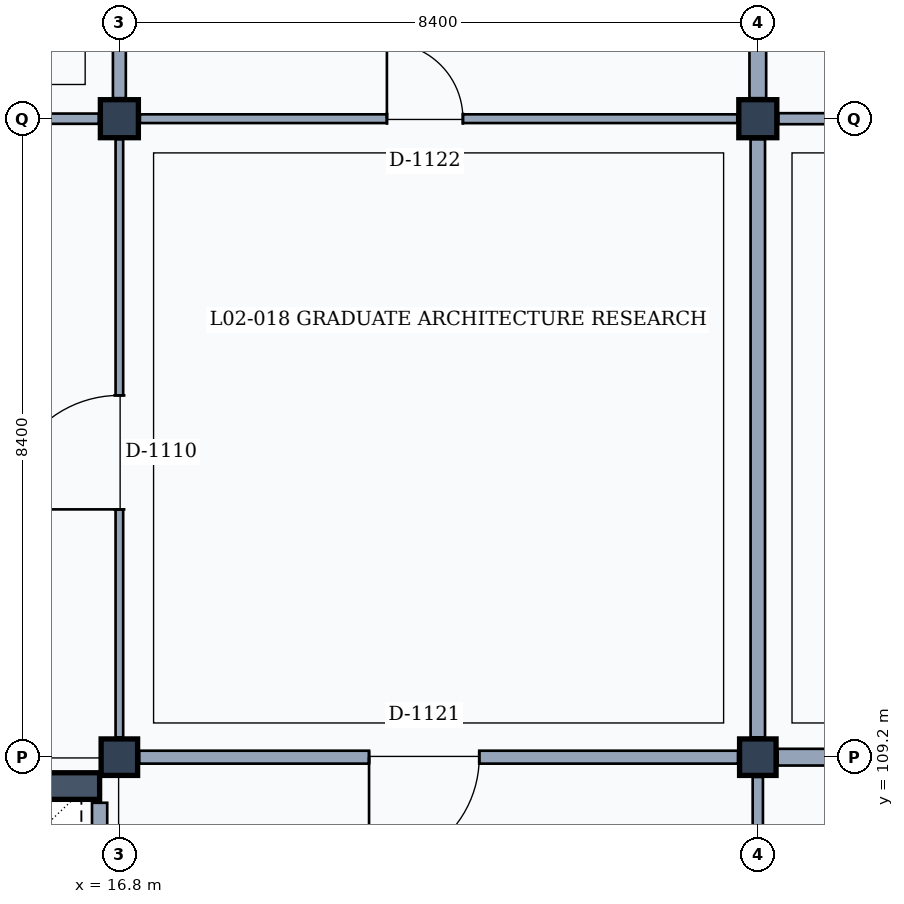
"""IFC4 building model, lengths in metres.
Left out: names, types, materials, properties, quantities, classifications, styles, units other than length and angle.
Written with IfcOpenShell. Run it as: python <this file> out.ifc"""

import sys

from ifc_helpers import new_model, si_unit, direction, frame, frame_2d, origin, origin_2d, place, context, subcontext, project, spatial, rectangle, extrude, element, fill, save


model = new_model("IFC4")
c1 = context("Model", 3, precision=1e-05, world=origin(), true_north=direction((0.0, 1.0)))
c2 = subcontext(c1, "Body", "Model", "MODEL_VIEW")
j1 = project(units=[si_unit("LENGTHUNIT", "METRE"), si_unit("PLANEANGLEUNIT", "RADIAN")], contexts=[c1])
p1 = place(None, origin())
s1 = spatial("IfcSite", under=j1, at=p1, CompositionType="ELEMENT")
p2 = place(p1, origin())
s2 = spatial("IfcBuilding", under=s1, at=p2, CompositionType="ELEMENT")
p3 = place(p2, frame((0.0, 0.0, 9.6)))
s3 = spatial("IfcBuildingStorey", under=s2, at=p3, CompositionType="ELEMENT", Elevation=9.6)
p4 = place(p3, frame((16.8, 109.2, 0.0), z_axis=(0.0, 0.0, 1.0), x_axis=(1.0, 0.0, 0.0)))
e1 = element("IfcColumn", 1, at=p4, inside=s3, PredefinedType="COLUMN", context=c2, shape_type="SweptSolid", body=[
    extrude(rectangle(XDim=0.48, YDim=0.48, at=origin_2d()), origin(), (0.0, 0.0, 1.0), 4.2),
])
p5 = place(p3, frame((16.8, 117.6, 0.0), z_axis=(0.0, 0.0, 1.0), x_axis=(1.0, 0.0, 0.0)))
e2 = element("IfcColumn", 2, at=p5, inside=s3, PredefinedType="COLUMN", context=c2, shape_type="SweptSolid", body=[
    extrude(rectangle(XDim=0.5, YDim=0.5, at=origin_2d()), origin(), (0.0, 0.0, 1.0), 4.2),
])
p6 = place(p3, frame((25.2, 109.2, 0.0), z_axis=(0.0, 0.0, 1.0), x_axis=(1.0, 0.0, 0.0)))
e3 = element("IfcColumn", 3, at=p6, inside=s3, PredefinedType="COLUMN", context=c2, shape_type="SweptSolid", body=[
    extrude(rectangle(XDim=0.48, YDim=0.48, at=origin_2d()), origin(), (0.0, 0.0, 1.0), 4.2),
])
p7 = place(p3, frame((25.2, 117.6, 0.0), z_axis=(0.0, 0.0, 1.0), x_axis=(1.0, 0.0, 0.0)))
e4 = element("IfcColumn", 4, at=p7, inside=s3, PredefinedType="COLUMN", context=c2, shape_type="SweptSolid", body=[
    extrude(rectangle(XDim=0.5, YDim=0.5, at=origin_2d()), origin(), (0.0, 0.0, 1.0), 4.2),
])
p8 = place(p3, frame((8.665, 108.82, 0.0), z_axis=(0.0, 0.0, 1.0), x_axis=(1.0, 0.0, 0.0)))
e5 = element("IfcWall", 5, at=p8, inside=s3, PredefinedType="SHEAR", context=c2, shape_type="SweptSolid", body=[
    extrude(rectangle(XDim=7.875, YDim=0.35, at=frame_2d((3.938, 0.0))), origin(), (0.0, 0.0, 1.0), 3.96),
])
p9 = place(p3, frame((16.54, 108.6, 0.0), z_axis=(0.0, 0.0, 1.0), x_axis=(0.0, -1.0, 0.0)))
e6 = element("IfcWall", 6, at=p9, inside=s3, PredefinedType="PARTITIONING", context=c2, shape_type="SweptSolid", body=[
    extrude(rectangle(XDim=7.2, YDim=0.2, at=frame_2d((3.6, 0.0))), origin(), (0.0, 0.0, 1.0), 3.32),
])
p10 = place(p9, frame((3.55, 0.0, 0.0)))
e7 = element("IfcOpeningElement", 7, at=p10, cuts=e6, PredefinedType="OPENING", context=c2, shape_type="SweptSolid", body=[
    extrude(rectangle(XDim=1.1, YDim=2.15, at=frame_2d((0.55, 1.075))), frame((0.0, 0.11, 0.0), z_axis=(0.0, -1.0, 0.0), x_axis=(1.0, 0.0, 0.0)), (0.0, 0.0, 1.0), 0.22),
])
p11 = place(p3, frame((16.8, 109.46, 0.0), z_axis=(0.0, 0.0, 1.0), x_axis=(0.0, 1.0, 0.0)))
e8 = element("IfcWall", 8, at=p11, inside=s3, PredefinedType="MOVABLE", context=c2, shape_type="SweptSolid", body=[
    extrude(rectangle(XDim=7.87, YDim=0.1, at=frame_2d((3.935, 0.0))), origin(), (0.0, 0.0, 1.0), 3.32),
])
p12 = place(p11, frame((3.0, 0.0, 0.0)))
e9 = element("IfcOpeningElement", 9, at=p12, cuts=e8, PredefinedType="OPENING", context=c2, shape_type="SweptSolid", body=[
    extrude(rectangle(XDim=1.5, YDim=2.3, at=frame_2d((0.75, 1.15))), frame((0.0, 0.06, 0.0), z_axis=(0.0, -1.0, 0.0), x_axis=(1.0, 0.0, 0.0)), (0.0, 0.0, 1.0), 0.12),
])
p13 = place(p3, frame((8.67, 117.6, 0.0), z_axis=(0.0, 0.0, 1.0), x_axis=(1.0, 0.0, 0.0)))
e10 = element("IfcWall", 10, at=p13, inside=s3, PredefinedType="PARTITIONING", context=c2, shape_type="SweptSolid", body=[
    extrude(rectangle(XDim=7.86, YDim=0.135, at=frame_2d((3.93, 0.0))), origin(), (0.0, 0.0, 1.0), 3.32),
])
p14 = place(p13, frame((2.925, 0.0, 0.0)))
e11 = element("IfcOpeningElement", 11, at=p14, cuts=e10, PredefinedType="OPENING", context=c2, shape_type="SweptSolid", body=[
    extrude(rectangle(XDim=1.65, YDim=2.25, at=frame_2d((0.825, 1.125))), frame((0.0, 0.077, 0.0), z_axis=(0.0, -1.0, 0.0), x_axis=(1.0, 0.0, 0.0)), (0.0, 0.0, 1.0), 0.155),
])
p15 = place(p3, frame((16.8, 117.87, 0.0), z_axis=(0.0, 0.0, 1.0), x_axis=(0.0, 1.0, 0.0)))
e12 = element("IfcWall", 12, at=p15, inside=s3, PredefinedType="PARTITIONING", context=c2, shape_type="SweptSolid", body=[
    extrude(rectangle(XDim=7.87, YDim=0.17, at=frame_2d((3.935, 0.0))), origin(), (0.0, 0.0, 1.0), 3.32),
])
p16 = place(p3, frame((25.2, 101.07, 0.0), z_axis=(0.0, 0.0, 1.0), x_axis=(0.0, 1.0, 0.0)))
e13 = element("IfcWall", 13, at=p16, inside=s3, PredefinedType="PARTITIONING", context=c2, shape_type="SweptSolid", body=[
    extrude(rectangle(XDim=7.87, YDim=0.135, at=frame_2d((3.935, 0.0))), origin(), (0.0, 0.0, 1.0), 3.32),
])
p17 = place(p16, frame((3.075, 0.0, 0.0)))
e14 = element("IfcOpeningElement", 14, at=p17, cuts=e13, PredefinedType="OPENING", context=c2, shape_type="SweptSolid", body=[
    extrude(rectangle(XDim=1.35, YDim=2.25, at=frame_2d((0.675, 1.125))), frame((0.0, 0.077, 0.0), z_axis=(0.0, -1.0, 0.0), x_axis=(1.0, 0.0, 0.0)), (0.0, 0.0, 1.0), 0.155),
])
p18 = place(p3, frame((17.06, 109.2, 0.0), z_axis=(0.0, 0.0, 1.0), x_axis=(1.0, 0.0, 0.0)))
e15 = element("IfcWall", 15, at=p18, inside=s3, PredefinedType="PARTITIONING", context=c2, shape_type="SweptSolid", body=[
    extrude(rectangle(XDim=7.88, YDim=0.17, at=frame_2d((3.94, 0.0))), origin(), (0.0, 0.0, 1.0), 3.32),
])
p19 = place(p18, frame((3.025, 0.0, 0.0)))
e16 = element("IfcOpeningElement", 16, at=p19, cuts=e15, PredefinedType="OPENING", context=c2, shape_type="SweptSolid", body=[
    extrude(rectangle(XDim=1.45, YDim=2.35, at=frame_2d((0.725, 1.175))), frame((0.0, 0.095, 0.0), z_axis=(0.0, -1.0, 0.0), x_axis=(1.0, 0.0, 0.0)), (0.0, 0.0, 1.0), 0.19),
])
p20 = place(p3, frame((25.2, 109.46, 0.0), z_axis=(0.0, 0.0, 1.0), x_axis=(0.0, 1.0, 0.0)))
e17 = element("IfcWall", 17, at=p20, inside=s3, PredefinedType="PARTITIONING", context=c2, shape_type="SweptSolid", body=[
    extrude(rectangle(XDim=7.87, YDim=0.19, at=frame_2d((3.935, 0.0))), origin(), (0.0, 0.0, 1.0), 3.32),
])
p21 = place(p3, frame((17.07, 117.6, 0.0), z_axis=(0.0, 0.0, 1.0), x_axis=(1.0, 0.0, 0.0)))
e18 = element("IfcWall", 18, at=p21, inside=s3, PredefinedType="PARTITIONING", context=c2, shape_type="SweptSolid", body=[
    extrude(rectangle(XDim=7.86, YDim=0.115, at=frame_2d((3.93, 0.0))), origin(), (0.0, 0.0, 1.0), 3.32),
])
p22 = place(p21, frame((3.25, 0.0, 0.0)))
e19 = element("IfcOpeningElement", 19, at=p22, cuts=e18, PredefinedType="OPENING", context=c2, shape_type="SweptSolid", body=[
    extrude(rectangle(XDim=1.0, YDim=2.15, at=frame_2d((0.5, 1.075))), frame((0.0, 0.067, 0.0), z_axis=(0.0, -1.0, 0.0), x_axis=(1.0, 0.0, 0.0)), (0.0, 0.0, 1.0), 0.135),
])
p23 = place(p3, frame((25.2, 117.87, 0.0), z_axis=(0.0, 0.0, 1.0), x_axis=(0.0, 1.0, 0.0)))
e20 = element("IfcWall", 20, at=p23, inside=s3, PredefinedType="PARTITIONING", context=c2, shape_type="SweptSolid", body=[
    extrude(rectangle(XDim=7.87, YDim=0.22, at=frame_2d((3.935, 0.0))), origin(), (0.0, 0.0, 1.0), 3.32),
])
p24 = place(p3, frame((25.46, 109.2, 0.0), z_axis=(0.0, 0.0, 1.0), x_axis=(1.0, 0.0, 0.0)))
e21 = element("IfcWall", 21, at=p24, inside=s3, PredefinedType="PARTITIONING", context=c2, shape_type="SweptSolid", body=[
    extrude(rectangle(XDim=7.9, YDim=0.22, at=frame_2d((3.95, 0.0))), origin(), (0.0, 0.0, 1.0), 3.32),
])
p25 = place(p24, frame((3.0, 0.0, 0.0)))
e22 = element("IfcOpeningElement", 22, at=p25, cuts=e21, PredefinedType="OPENING", context=c2, shape_type="SweptSolid", body=[
    extrude(rectangle(XDim=1.5, YDim=2.3, at=frame_2d((0.75, 1.15))), frame((0.0, 0.12, 0.0), z_axis=(0.0, -1.0, 0.0), x_axis=(1.0, 0.0, 0.0)), (0.0, 0.0, 1.0), 0.24),
])
p26 = place(p3, frame((25.47, 117.6, 0.0), z_axis=(0.0, 0.0, 1.0), x_axis=(1.0, 0.0, 0.0)))
e23 = element("IfcWall", 23, at=p26, inside=s3, PredefinedType="PARTITIONING", context=c2, shape_type="SweptSolid", body=[
    extrude(rectangle(XDim=7.88, YDim=0.145, at=frame_2d((3.94, 0.0))), origin(), (0.0, 0.0, 1.0), 3.32),
])
p27 = place(p26, frame((2.925, 0.0, 0.0)))
e24 = element("IfcOpeningElement", 24, at=p27, cuts=e23, PredefinedType="OPENING", context=c2, shape_type="SweptSolid", body=[
    extrude(rectangle(XDim=1.65, YDim=2.25, at=frame_2d((0.825, 1.125))), frame((0.0, 0.083, 0.0), z_axis=(0.0, -1.0, 0.0), x_axis=(1.0, 0.0, 0.0)), (0.0, 0.0, 1.0), 0.165),
])
p28 = place(p12, origin())
e25 = element("IfcDoor", 25, at=p28, inside=s3, OperationType="SINGLE_SWING_LEFT", PredefinedType="DOOR", context=c2, shape_type="SweptSolid", body=[
    extrude(rectangle(XDim=1.5, YDim=2.3, at=frame_2d((0.75, 1.15))), frame((0.0, 0.025, 0.0), z_axis=(0.0, -1.0, 0.0), x_axis=(1.0, 0.0, 0.0)), (0.0, 0.0, 1.0), 0.05),
])
fill(e9, e25)
p29 = place(p19, frame((1.45, 0.0, 0.0), z_axis=(0.0, 0.0, 1.0), x_axis=(-1.0, 0.0, 0.0)))
e26 = element("IfcDoor", 26, at=p29, inside=s3, OperationType="SINGLE_SWING_RIGHT", PredefinedType="DOOR", context=c2, shape_type="SweptSolid", body=[
    extrude(rectangle(XDim=1.45, YDim=2.35, at=frame_2d((0.725, 1.175))), frame((0.0, 0.025, 0.0), z_axis=(0.0, -1.0, 0.0), x_axis=(1.0, 0.0, 0.0)), (0.0, 0.0, 1.0), 0.05),
])
fill(e16, e26)
p30 = place(p22, origin())
e27 = element("IfcDoor", 27, at=p30, inside=s3, OperationType="SINGLE_SWING_LEFT", PredefinedType="DOOR", context=c2, shape_type="SweptSolid", body=[
    extrude(rectangle(XDim=1.0, YDim=2.15, at=frame_2d((0.5, 1.075))), frame((0.0, 0.025, 0.0), z_axis=(0.0, -1.0, 0.0), x_axis=(1.0, 0.0, 0.0)), (0.0, 0.0, 1.0), 0.05),
])
fill(e19, e27)
save(model, sys.argv[1])
